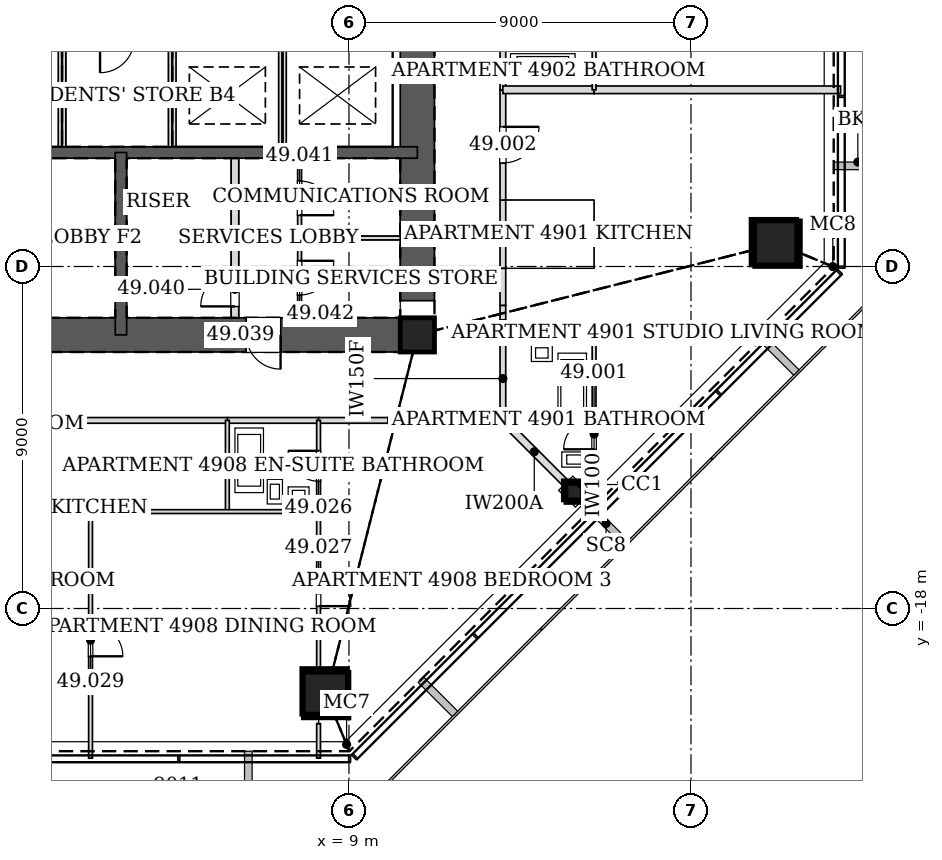
"""IFC4 building model, lengths in metres.
Left out: names, types, materials, properties, quantities, classifications, styles, units other than length and angle.
Written with IfcOpenShell. Run it as: python <this file> out.ifc"""

import sys

from ifc_helpers import new_model, si_unit, direction, frame, frame_2d, origin, origin_2d, place, context, subcontext, project, spatial, rectangle, hollow_rectangle, extrude, element, fill, save


model = new_model("IFC4")
c1 = context("Model", 3, precision=1e-05, world=origin(), true_north=direction((0.0, 1.0)))
c2 = subcontext(c1, "Body", "Model", "MODEL_VIEW")
j1 = project(units=[si_unit("LENGTHUNIT", "METRE"), si_unit("PLANEANGLEUNIT", "RADIAN")], contexts=[c1])
p1 = place(None, origin())
s1 = spatial("IfcSite", under=j1, at=p1, CompositionType="ELEMENT")
p2 = place(p1, origin())
s2 = spatial("IfcBuilding", under=s1, at=p2, CompositionType="ELEMENT")
p3 = place(p2, frame((0.0, 0.0, 214.2)))
s3 = spatial("IfcBuildingStorey", under=s2, at=p3, CompositionType="ELEMENT", Elevation=214.2)
for number, where, z_axis, x_axis in (
    (1, (8.399, -20.277, 0.0), (-0.012, 0.028, 1.0), (-0.923, -0.384, 0.0)),
    (2, (20.277, -8.399, 0.0), (-0.028, 0.012, 1.0), (-0.384, -0.923, 0.0)),
):
    element("IfcColumn", number, at=place(p3, frame(where, z_axis=z_axis, x_axis=x_axis)), inside=s3, PredefinedType="COLUMN", context=c2, shape_type="SweptSolid", body=[
        extrude(hollow_rectangle(XDim=1.2, YDim=1.2, WallThickness=0.055, at=origin_2d()), origin(), (0.0, 0.0, 1.0), 3.402),
    ])
p4 = place(p3, frame((14.959, -14.959, 0.0), z_axis=(-0.019953277583, 0.019953277583, 0.999601787427), x_axis=(-0.707106781187, -0.707106781187, 0.0)))
e3 = element("IfcColumn", 3, at=p4, inside=s3, PredefinedType="COLUMN", context=c2, shape_type="SweptSolid", body=[
    extrude(hollow_rectangle(XDim=0.5, YDim=0.5, WallThickness=0.025, at=origin_2d()), origin(), (0.0, 0.0, 1.0), 3.402),
])
p5 = place(p3, frame((10.8, -10.8, 0.0), z_axis=(0.0, 0.0, 1.0), x_axis=(1.0, 0.0, 0.0)))
e4 = element("IfcColumn", 4, at=p5, inside=s3, PredefinedType="COLUMN", context=c2, shape_type="SweptSolid", body=[
    extrude(hollow_rectangle(XDim=0.9, YDim=0.9, WallThickness=0.05, at=origin_2d()), origin(), (0.0, 0.0, 1.0), 3.4),
])
p6 = place(p3, frame((-10.8, -10.8, 0.0), z_axis=(0.0, 0.0, 1.0), x_axis=(1.0, 0.0, 0.0)))
e5 = element("IfcWall", 5, at=p6, inside=s3, PredefinedType="SOLIDWALL", context=c2, shape_type="SweptSolid", body=[
    extrude(rectangle(XDim=21.6, YDim=0.9, at=frame_2d((10.8, 0.0))), origin(), (0.0, 0.0, 1.0), 3.4),
])
p7 = place(p6, frame((10.05, 0.0, 0.0)))
e6 = element("IfcOpeningElement", 6, at=p7, cuts=e5, PredefinedType="OPENING", context=c2, shape_type="SweptSolid", body=[
    extrude(rectangle(XDim=1.5, YDim=2.1, at=frame_2d((0.75, 1.05))), frame((0.0, 0.46, 0.0), z_axis=(0.0, -1.0, 0.0), x_axis=(1.0, 0.0, 0.0)), (0.0, 0.0, 1.0), 0.92),
])
p8 = place(p6, frame((17.1, 0.0, 0.0)))
e7 = element("IfcOpeningElement", 7, at=p8, cuts=e5, PredefinedType="OPENING", context=c2, shape_type="SweptSolid", body=[
    extrude(rectangle(XDim=0.9, YDim=2.1, at=frame_2d((0.45, 1.05))), frame((0.0, 0.46, 0.0), z_axis=(0.0, -1.0, 0.0), x_axis=(1.0, 0.0, 0.0)), (0.0, 0.0, 1.0), 0.92),
])
p9 = place(p3, frame((10.8, -10.8, 0.0), z_axis=(0.0, 0.0, 1.0), x_axis=(0.0, 1.0, 0.0)))
e8 = element("IfcWall", 8, at=p9, inside=s3, PredefinedType="SOLIDWALL", context=c2, shape_type="SweptSolid", body=[
    extrude(rectangle(XDim=21.6, YDim=0.9, at=frame_2d((10.8, 0.0))), origin(), (0.0, 0.0, 1.0), 3.4),
])
p10 = place(p9, frame((11.7, 0.0, 0.0)))
e9 = element("IfcOpeningElement", 9, at=p10, cuts=e8, PredefinedType="OPENING", context=c2, shape_type="SweptSolid", body=[
    extrude(rectangle(XDim=1.2, YDim=2.1, at=frame_2d((0.6, 1.05))), frame((0.0, 0.46, 0.0), z_axis=(0.0, -1.0, 0.0), x_axis=(1.0, 0.0, 0.0)), (0.0, 0.0, 1.0), 0.92),
])
p11 = place(p9, frame((8.7, 0.0, 0.0)))
e10 = element("IfcOpeningElement", 10, at=p11, cuts=e8, PredefinedType="OPENING", context=c2, shape_type="SweptSolid", body=[
    extrude(rectangle(XDim=1.2, YDim=2.1, at=frame_2d((0.6, 1.05))), frame((0.0, 0.46, 0.0), z_axis=(0.0, -1.0, 0.0), x_axis=(1.0, 0.0, 0.0)), (0.0, 0.0, 1.0), 0.92),
])
p12 = place(p3, frame((-10.8, -6.0, 0.0), z_axis=(0.0, 0.0, 1.0), x_axis=(1.0, 0.0, 0.0)))
e11 = element("IfcWall", 11, at=p12, inside=s3, PredefinedType="SOLIDWALL", context=c2, shape_type="SweptSolid", body=[
    extrude(rectangle(XDim=21.6, YDim=0.3, at=frame_2d((10.8, 0.0))), origin(), (0.0, 0.0, 1.0), 3.4),
])
p13 = place(p12, frame((10.25, 0.0, 0.0)))
e12 = element("IfcOpeningElement", 12, at=p13, cuts=e11, PredefinedType="OPENING", context=c2, shape_type="SweptSolid", body=[
    extrude(rectangle(XDim=1.1, YDim=2.1, at=frame_2d((0.55, 1.05))), frame((0.0, 0.16, 0.0), z_axis=(0.0, -1.0, 0.0), x_axis=(1.0, 0.0, 0.0)), (0.0, 0.0, 1.0), 0.32),
])
p14 = place(p3, frame((3.0, -6.0, 0.0), z_axis=(0.0, 0.0, 1.0), x_axis=(0.0, -1.0, 0.0)))
e13 = element("IfcWall", 13, at=p14, inside=s3, PredefinedType="SOLIDWALL", context=c2, shape_type="SweptSolid", body=[
    extrude(rectangle(XDim=4.8, YDim=0.3, at=frame_2d((2.4, 0.0))), origin(), (0.0, 0.0, 1.0), 3.4),
])
p15 = place(p3, frame((13.05, -13.05, 0.0), z_axis=(0.0, 0.0, 1.0), x_axis=(0.0, 1.0, 0.0)))
e14 = element("IfcWall", 14, at=p15, inside=s3, PredefinedType="PARTITIONING", context=c2, shape_type="SweptSolid", body=[
    extrude(rectangle(XDim=2.201, YDim=0.15, at=frame_2d((1.101, 0.0))), origin(), (0.0, 0.0, 1.0), 2.578),
])
p16 = place(p3, frame((13.05, -9.051, 0.0), z_axis=(0.0, 0.0, 1.0), x_axis=(0.0, 1.0, 0.0)))
e15 = element("IfcWall", 15, at=p16, inside=s3, PredefinedType="PARTITIONING", context=c2, shape_type="SweptSolid", body=[
    extrude(rectangle(XDim=1.802, YDim=0.15, at=frame_2d((0.901, 0.0))), origin(), (0.0, 0.0, 1.0), 3.2),
])
p17 = place(p3, frame((13.05, -10.851, 0.0), z_axis=(0.0, 0.0, 1.0), x_axis=(0.0, 1.0, 0.0)))
e16 = element("IfcWall", 16, at=p17, inside=s3, PredefinedType="PARTITIONING", context=c2, shape_type="SweptSolid", body=[
    extrude(rectangle(XDim=0.447, YDim=0.15, at=frame_2d((0.224, 0.0))), origin(), (0.0, 0.0, 1.0), 3.2),
])
p18 = place(p3, frame((13.05, -10.027, 0.0), z_axis=(0.0, 0.0, 1.0), x_axis=(0.0, 1.0, 0.0)))
e17 = element("IfcWall", 17, at=p18, inside=s3, PredefinedType="PARTITIONING", context=c2, shape_type="SweptSolid", body=[
    extrude(rectangle(XDim=0.978, YDim=0.15, at=frame_2d((0.489, 0.0))), origin(), (0.0, 0.0, 1.0), 3.2),
])
p19 = place(p3, frame((13.05, -10.404, 0.0), z_axis=(0.0, 0.0, 1.0), x_axis=(0.0, 1.0, 0.0)))
e18 = element("IfcWall", 18, at=p19, inside=s3, PredefinedType="PARTITIONING", context=c2, shape_type="SweptSolid", body=[
    extrude(rectangle(XDim=0.377, YDim=0.15, at=frame_2d((0.188, 0.0))), origin(), (0.0, 0.0, 1.0), 2.268),
])
p20 = place(p3, frame((13.05, -7.251, 0.0), z_axis=(0.0, 0.0, 1.0), x_axis=(0.0, 1.0, 0.0)))
e19 = element("IfcWall", 19, at=p20, inside=s3, PredefinedType="PARTITIONING", context=c2, shape_type="SweptSolid", body=[
    extrude(rectangle(XDim=2.902, YDim=0.15, at=frame_2d((1.451, 0.0))), origin(), (0.0, 0.0, 1.0), 3.2),
])
p21 = place(p20, frame((0.976, 0.0, 0.0)))
e20 = element("IfcOpeningElement", 20, at=p21, cuts=e19, PredefinedType="OPENING", context=c2, shape_type="SweptSolid", body=[
    extrude(rectangle(XDim=0.95, YDim=2.1, at=frame_2d((0.475, 1.05))), frame((0.0, 0.085, 0.0), z_axis=(0.0, -1.0, 0.0), x_axis=(1.0, 0.0, 0.0)), (0.0, 0.0, 1.0), 0.17),
])
p22 = place(p3, frame((13.05, -4.351, 0.0), z_axis=(0.0, 0.0, 1.0), x_axis=(0.0, 1.0, 0.0)))
e21 = element("IfcWall", 21, at=p22, inside=s3, PredefinedType="PARTITIONING", context=c2, shape_type="SweptSolid", body=[
    extrude(rectangle(XDim=2.202, YDim=0.15, at=frame_2d((1.101, 0.0))), origin(), (0.0, 0.0, 1.0), 3.2),
])
p23 = place(p3, frame((5.799, -13.05, 0.0), z_axis=(0.0, 0.0, 1.0), x_axis=(1.0, 0.0, 0.0)))
e22 = element("IfcWall", 22, at=p23, inside=s3, PredefinedType="PARTITIONING", context=c2, shape_type="SweptSolid", body=[
    extrude(rectangle(XDim=2.402, YDim=0.15, at=frame_2d((1.201, 0.0))), origin(), (0.0, 0.0, 1.0), 3.2),
])
p24 = place(p3, frame((8.199, -13.05, 0.0), z_axis=(0.0, 0.0, 1.0), x_axis=(1.0, 0.0, 0.0)))
e23 = element("IfcWall", 23, at=p24, inside=s3, PredefinedType="PARTITIONING", context=c2, shape_type="SweptSolid", body=[
    extrude(rectangle(XDim=1.828, YDim=0.15, at=frame_2d((0.914, 0.0))), origin(), (0.0, 0.0, 1.0), 3.2),
])
p25 = place(p3, frame((10.404, -13.05, 0.0), z_axis=(0.0, 0.0, 1.0), x_axis=(1.0, 0.0, 0.0)))
e24 = element("IfcWall", 24, at=p25, inside=s3, PredefinedType="PARTITIONING", context=c2, shape_type="SweptSolid", body=[
    extrude(rectangle(XDim=2.646, YDim=0.15, at=frame_2d((1.323, 0.0))), origin(), (0.0, 0.0, 1.0), 2.578),
])
p26 = place(p3, frame((10.027, -13.05, 0.0), z_axis=(0.0, 0.0, 1.0), x_axis=(1.0, 0.0, 0.0)))
e25 = element("IfcWall", 25, at=p26, inside=s3, PredefinedType="PARTITIONING", context=c2, shape_type="SweptSolid", body=[
    extrude(rectangle(XDim=0.377, YDim=0.15, at=frame_2d((0.188, 0.0))), origin(), (0.0, 0.0, 1.0), 2.268),
])
p27 = place(p3, frame((0.799, -13.05, 0.0), z_axis=(0.0, 0.0, 1.0), x_axis=(1.0, 0.0, 0.0)))
e26 = element("IfcWall", 26, at=p27, inside=s3, PredefinedType="PARTITIONING", context=c2, shape_type="SweptSolid", body=[
    extrude(rectangle(XDim=5.002, YDim=0.15, at=frame_2d((2.501, 0.0))), origin(), (0.0, 0.0, 1.0), 3.2),
])
p28 = place(p3, frame((15.45, -15.467, 0.0), z_axis=(0.0, 0.0, 1.0), x_axis=(0.0, 1.0, 0.0)))
e27 = element("IfcWall", 27, at=p28, inside=s3, PredefinedType="PARTITIONING", context=c2, shape_type="SweptSolid", body=[
    extrude(rectangle(XDim=4.617, YDim=0.1, at=frame_2d((2.309, 0.0))), origin(), (0.0, 0.0, 1.0), 2.784),
])
p29 = place(p28, frame((1.656, 0.0, 0.0)))
e28 = element("IfcOpeningElement", 28, at=p29, cuts=e27, PredefinedType="OPENING", context=c2, shape_type="SweptSolid", body=[
    extrude(rectangle(XDim=0.8, YDim=2.1, at=frame_2d((0.4, 1.05))), frame((0.0, 0.06, 0.0), z_axis=(0.0, -1.0, 0.0), x_axis=(1.0, 0.0, 0.0)), (0.0, 0.0, 1.0), 0.12),
])
p30 = place(p3, frame((15.45, -10.85, 0.0), z_axis=(0.0, 0.0, 1.0), x_axis=(-1.0, 0.0, 0.0)))
e29 = element("IfcWall", 29, at=p30, inside=s3, PredefinedType="PARTITIONING", context=c2, shape_type="SweptSolid", body=[
    extrude(rectangle(XDim=2.4, YDim=0.1, at=frame_2d((1.2, 0.0))), origin(), (0.0, 0.0, 1.0), 2.74),
])
p31 = place(p3, frame((13.05, -13.05, 0.0), z_axis=(0.0, 0.0, 1.0), x_axis=(0.707106781187, -0.707106781187, 0.0)))
e30 = element("IfcWall", 30, at=p31, inside=s3, PredefinedType="PARTITIONING", context=c2, shape_type="SweptSolid", body=[
    extrude(rectangle(XDim=2.334, YDim=0.2, at=frame_2d((1.167, 0.0))), origin(), (0.0, 0.0, 1.0), 2.578),
])
p32 = place(p3, frame((15.451, -4.35, 0.0), z_axis=(0.0, 0.0, 1.0), x_axis=(-1.0, 0.0, 0.0)))
e31 = element("IfcWall", 31, at=p32, inside=s3, PredefinedType="PARTITIONING", context=c2, shape_type="SweptSolid", body=[
    extrude(rectangle(XDim=2.401, YDim=0.2, at=frame_2d((1.2, 0.0))), origin(), (0.0, 0.0, 1.0), 2.591),
])
p33 = place(p3, frame((21.937, -4.35, 0.0), z_axis=(0.0, 0.0, 1.0), x_axis=(-1.0, 0.0, 0.0)))
e32 = element("IfcWall", 32, at=p33, inside=s3, PredefinedType="PARTITIONING", context=c2, shape_type="SweptSolid", body=[
    extrude(rectangle(XDim=6.488, YDim=0.2, at=frame_2d((3.244, 0.0))), origin(), (0.0, 0.0, 1.0), 2.591),
])
p34 = place(p3, frame((15.45, -4.35, 0.0), z_axis=(0.0, 0.0, 1.0), x_axis=(0.0, 1.0, 0.0)))
e33 = element("IfcWall", 33, at=p34, inside=s3, PredefinedType="PARTITIONING", context=c2, shape_type="SweptSolid", body=[
    extrude(rectangle(XDim=2.2, YDim=0.1, at=frame_2d((1.1, 0.0))), origin(), (0.0, 0.0, 1.0), 3.2),
])
p35 = place(p3, frame((8.2, -15.45, 0.0), z_axis=(0.0, 0.0, 1.0), x_axis=(0.0, 1.0, 0.0)))
e34 = element("IfcWall", 34, at=p35, inside=s3, PredefinedType="PARTITIONING", context=c2, shape_type="SweptSolid", body=[
    extrude(rectangle(XDim=2.4, YDim=0.1, at=frame_2d((1.2, 0.0))), origin(), (0.0, 0.0, 1.0), 2.591),
])
p36 = place(p35, frame((0.8, 0.0, 0.0)))
e35 = element("IfcOpeningElement", 35, at=p36, cuts=e34, PredefinedType="OPENING", context=c2, shape_type="SweptSolid", body=[
    extrude(rectangle(XDim=0.8, YDim=2.1, at=frame_2d((0.4, 1.05))), frame((0.0, 0.06, 0.0), z_axis=(0.0, -1.0, 0.0), x_axis=(1.0, 0.0, 0.0)), (0.0, 0.0, 1.0), 0.12),
])
p37 = place(p3, frame((5.8, -13.05, 0.0), z_axis=(0.0, 0.0, 1.0), x_axis=(0.0, -1.0, 0.0)))
e36 = element("IfcWall", 36, at=p37, inside=s3, PredefinedType="PARTITIONING", context=c2, shape_type="SweptSolid", body=[
    extrude(rectangle(XDim=2.4, YDim=0.1, at=frame_2d((1.2, 0.0))), origin(), (0.0, 0.0, 1.0), 2.591),
])
p38 = place(p3, frame((8.2, -15.45, 0.0), z_axis=(0.0, 0.0, 1.0), x_axis=(-1.0, 0.0, 0.0)))
e37 = element("IfcWall", 37, at=p38, inside=s3, PredefinedType="PARTITIONING", context=c2, shape_type="SweptSolid", body=[
    extrude(rectangle(XDim=6.0, YDim=0.1, at=frame_2d((3.0, 0.0))), origin(), (0.0, 0.0, 1.0), 3.2),
])
p39 = place(p3, frame((8.2, -15.449, 0.0), z_axis=(0.0, 0.0, 1.0), x_axis=(0.0, -1.0, 0.0)))
e38 = element("IfcWall", 38, at=p39, inside=s3, PredefinedType="PARTITIONING", context=c2, shape_type="SweptSolid", body=[
    extrude(rectangle(XDim=4.128, YDim=0.1, at=frame_2d((2.064, 0.0))), origin(), (0.0, 0.0, 1.0), 2.591),
])
p40 = place(p39, frame((1.639, 0.0, 0.0)))
e39 = element("IfcOpeningElement", 39, at=p40, cuts=e38, PredefinedType="OPENING", context=c2, shape_type="SweptSolid", body=[
    extrude(rectangle(XDim=0.85, YDim=2.1, at=frame_2d((0.425, 1.05))), frame((0.0, 0.06, 0.0), z_axis=(0.0, -1.0, 0.0), x_axis=(1.0, 0.0, 0.0)), (0.0, 0.0, 1.0), 0.12),
])
p41 = place(p3, frame((8.2, -21.03, 0.0), z_axis=(0.0, 0.0, 1.0), x_axis=(0.0, -1.0, 0.0)))
e40 = element("IfcWall", 40, at=p41, inside=s3, PredefinedType="PARTITIONING", context=c2, shape_type="SweptSolid", body=[
    extrude(rectangle(XDim=0.907, YDim=0.1, at=frame_2d((0.454, 0.0))), origin(), (0.0, 0.0, 1.0), 3.2),
])
p42 = place(p3, frame((2.2, -21.939, 0.0), z_axis=(0.0, 0.0, 1.0), x_axis=(0.0, 1.0, 0.0)))
e41 = element("IfcWall", 41, at=p42, inside=s3, PredefinedType="PARTITIONING", context=c2, shape_type="SweptSolid", body=[
    extrude(rectangle(XDim=6.489, YDim=0.1, at=frame_2d((3.245, 0.0))), origin(), (0.0, 0.0, 1.0), 2.591),
])
p43 = place(p42, frame((2.682, 0.0, 0.0)))
e42 = element("IfcOpeningElement", 42, at=p43, cuts=e41, PredefinedType="OPENING", context=c2, shape_type="SweptSolid", body=[
    extrude(rectangle(XDim=0.85, YDim=2.1, at=frame_2d((0.425, 1.05))), frame((0.0, 0.06, 0.0), z_axis=(0.0, -1.0, 0.0), x_axis=(1.0, 0.0, 0.0)), (0.0, 0.0, 1.0), 0.12),
])
for number, where, z_axis, x_axis in (
    (43, (1.45, -5.85, 0.0), (0.0, 0.0, 1.0), (0.0, 1.0, 0.0)),
    (44, (4.35, -5.85, 0.0), (0.0, 0.0, 1.0), (0.0, 1.0, 0.0)),
):
    element("IfcWall", number, at=place(p3, frame(where, z_axis=z_axis, x_axis=x_axis)), inside=s3, PredefinedType="PARTITIONING", context=c2, shape_type="SweptSolid", body=[
        extrude(rectangle(XDim=2.7, YDim=0.2, at=frame_2d((1.35, 0.0))), origin(), (0.0, 0.0, 1.0), 3.2),
    ])
p44 = place(p3, frame((7.25, -5.85, 0.0), z_axis=(0.0, 0.0, 1.0), x_axis=(0.0, 1.0, 0.0)))
e45 = element("IfcWall", 45, at=p44, inside=s3, PredefinedType="PARTITIONING", context=c2, shape_type="SweptSolid", body=[
    extrude(rectangle(XDim=2.7, YDim=0.2, at=frame_2d((1.35, 0.0))), origin(), (0.0, 0.0, 1.0), 3.4),
])
p45 = place(p3, frame((6.0, -10.35, 0.0), z_axis=(0.0, 0.0, 1.0), x_axis=(0.0, 1.0, 0.0)))
e46 = element("IfcWall", 46, at=p45, inside=s3, PredefinedType="PARTITIONING", context=c2, shape_type="SweptSolid", body=[
    extrude(rectangle(XDim=4.2, YDim=0.2, at=frame_2d((2.1, 0.0))), origin(), (0.0, 0.0, 1.0), 3.2),
])
p46 = place(p45, frame((0.3, 0.0, 0.0)))
e47 = element("IfcOpeningElement", 47, at=p46, cuts=e46, PredefinedType="OPENING", context=c2, shape_type="SweptSolid", body=[
    extrude(rectangle(XDim=0.9, YDim=2.1, at=frame_2d((0.45, 1.05))), frame((0.0, 0.11, 0.0), z_axis=(0.0, -1.0, 0.0), x_axis=(1.0, 0.0, 0.0)), (0.0, 0.0, 1.0), 0.22),
])
p47 = place(p3, frame((7.7, -10.35, 0.0), z_axis=(0.0, 0.0, 1.0), x_axis=(0.0, 1.0, 0.0)))
e48 = element("IfcWall", 48, at=p47, inside=s3, PredefinedType="PARTITIONING", context=c2, shape_type="SweptSolid", body=[
    extrude(rectangle(XDim=4.2, YDim=0.1, at=frame_2d((2.1, 0.0))), origin(), (0.0, 0.0, 1.0), 3.2),
])
p48 = place(p47, frame((2.7, 0.0, 0.0)))
e49 = element("IfcOpeningElement", 49, at=p48, cuts=e48, PredefinedType="OPENING", context=c2, shape_type="SweptSolid", body=[
    extrude(rectangle(XDim=0.9, YDim=2.1, at=frame_2d((0.45, 1.05))), frame((0.0, 0.06, 0.0), z_axis=(0.0, -1.0, 0.0), x_axis=(1.0, 0.0, 0.0)), (0.0, 0.0, 1.0), 0.12),
])
p49 = place(p47, frame((0.6, 0.0, 0.0)))
e50 = element("IfcOpeningElement", 50, at=p49, cuts=e48, PredefinedType="OPENING", context=c2, shape_type="SweptSolid", body=[
    extrude(rectangle(XDim=0.9, YDim=2.1, at=frame_2d((0.45, 1.05))), frame((0.0, 0.06, 0.0), z_axis=(0.0, -1.0, 0.0), x_axis=(1.0, 0.0, 0.0)), (0.0, 0.0, 1.0), 0.12),
])
p50 = place(p3, frame((7.7, -8.25, 0.0), z_axis=(0.0, 0.0, 1.0), x_axis=(1.0, 0.0, 0.0)))
e51 = element("IfcWall", 51, at=p50, inside=s3, PredefinedType="PARTITIONING", context=c2, shape_type="SweptSolid", body=[
    extrude(rectangle(XDim=2.65, YDim=0.1, at=frame_2d((1.325, 0.0))), origin(), (0.0, 0.0, 1.0), 3.2),
])
p51 = place(p29, origin())
e52 = element("IfcDoor", 52, at=p51, inside=s3, OperationType="SINGLE_SWING_LEFT", PredefinedType="DOOR", context=c2, shape_type="SweptSolid", body=[
    extrude(rectangle(XDim=0.8, YDim=2.1, at=frame_2d((0.4, 1.05))), frame((0.0, 0.025, 0.0), z_axis=(0.0, -1.0, 0.0), x_axis=(1.0, 0.0, 0.0)), (0.0, 0.0, 1.0), 0.05),
])
fill(e28, e52)
p52 = place(p21, frame((0.95, 0.0, 0.0), z_axis=(0.0, 0.0, 1.0), x_axis=(-1.0, 0.0, 0.0)))
e53 = element("IfcDoor", 53, at=p52, inside=s3, OperationType="SINGLE_SWING_LEFT", PredefinedType="DOOR", context=c2, shape_type="SweptSolid", body=[
    extrude(rectangle(XDim=0.95, YDim=2.1, at=frame_2d((0.475, 1.05))), frame((0.0, 0.025, 0.0), z_axis=(0.0, -1.0, 0.0), x_axis=(1.0, 0.0, 0.0)), (0.0, 0.0, 1.0), 0.05),
])
fill(e20, e53)
p53 = place(p36, origin())
e54 = element("IfcDoor", 54, at=p53, inside=s3, OperationType="SINGLE_SWING_RIGHT", PredefinedType="DOOR", context=c2, shape_type="SweptSolid", body=[
    extrude(rectangle(XDim=0.8, YDim=2.1, at=frame_2d((0.4, 1.05))), frame((0.0, 0.025, 0.0), z_axis=(0.0, -1.0, 0.0), x_axis=(1.0, 0.0, 0.0)), (0.0, 0.0, 1.0), 0.05),
])
fill(e35, e54)
p54 = place(p40, origin())
e55 = element("IfcDoor", 55, at=p54, inside=s3, OperationType="SINGLE_SWING_RIGHT", PredefinedType="DOOR", context=c2, shape_type="SweptSolid", body=[
    extrude(rectangle(XDim=0.85, YDim=2.1, at=frame_2d((0.425, 1.05))), frame((0.0, 0.025, 0.0), z_axis=(0.0, -1.0, 0.0), x_axis=(1.0, 0.0, 0.0)), (0.0, 0.0, 1.0), 0.05),
])
fill(e39, e55)
p55 = place(p43, frame((0.85, 0.0, 0.0), z_axis=(0.0, 0.0, 1.0), x_axis=(-1.0, 0.0, 0.0)))
e56 = element("IfcDoor", 56, at=p55, inside=s3, OperationType="SINGLE_SWING_RIGHT", PredefinedType="DOOR", context=c2, shape_type="SweptSolid", body=[
    extrude(rectangle(XDim=0.85, YDim=2.1, at=frame_2d((0.425, 1.05))), frame((0.0, 0.025, 0.0), z_axis=(0.0, -1.0, 0.0), x_axis=(1.0, 0.0, 0.0)), (0.0, 0.0, 1.0), 0.05),
])
fill(e42, e56)
p56 = place(p8, frame((0.9, 0.0, 0.0), z_axis=(0.0, 0.0, 1.0), x_axis=(-1.0, 0.0, 0.0)))
e57 = element("IfcDoor", 57, at=p56, inside=s3, OperationType="SINGLE_SWING_LEFT", PredefinedType="DOOR", context=c2, shape_type="SweptSolid", body=[
    extrude(rectangle(XDim=0.9, YDim=2.1, at=frame_2d((0.45, 1.05))), frame((0.0, 0.025, 0.0), z_axis=(0.0, -1.0, 0.0), x_axis=(1.0, 0.0, 0.0)), (0.0, 0.0, 1.0), 0.05),
])
fill(e7, e57)
p57 = place(p46, origin())
e58 = element("IfcDoor", 58, at=p57, inside=s3, OperationType="SINGLE_SWING_LEFT", PredefinedType="DOOR", context=c2, shape_type="SweptSolid", body=[
    extrude(rectangle(XDim=0.9, YDim=2.1, at=frame_2d((0.45, 1.05))), frame((0.0, 0.025, 0.0), z_axis=(0.0, -1.0, 0.0), x_axis=(1.0, 0.0, 0.0)), (0.0, 0.0, 1.0), 0.05),
])
fill(e47, e58)
p58 = place(p48, frame((0.9, 0.0, 0.0), z_axis=(0.0, 0.0, 1.0), x_axis=(-1.0, 0.0, 0.0)))
e59 = element("IfcDoor", 59, at=p58, inside=s3, OperationType="SINGLE_SWING_RIGHT", PredefinedType="DOOR", context=c2, shape_type="SweptSolid", body=[
    extrude(rectangle(XDim=0.9, YDim=2.1, at=frame_2d((0.45, 1.05))), frame((0.0, 0.025, 0.0), z_axis=(0.0, -1.0, 0.0), x_axis=(1.0, 0.0, 0.0)), (0.0, 0.0, 1.0), 0.05),
])
fill(e49, e59)
p59 = place(p49, frame((0.9, 0.0, 0.0), z_axis=(0.0, 0.0, 1.0), x_axis=(-1.0, 0.0, 0.0)))
e60 = element("IfcDoor", 60, at=p59, inside=s3, OperationType="SINGLE_SWING_LEFT", PredefinedType="DOOR", context=c2, shape_type="SweptSolid", body=[
    extrude(rectangle(XDim=0.9, YDim=2.1, at=frame_2d((0.45, 1.05))), frame((0.0, 0.025, 0.0), z_axis=(0.0, -1.0, 0.0), x_axis=(1.0, 0.0, 0.0)), (0.0, 0.0, 1.0), 0.05),
])
fill(e50, e60)
save(model, sys.argv[1])
